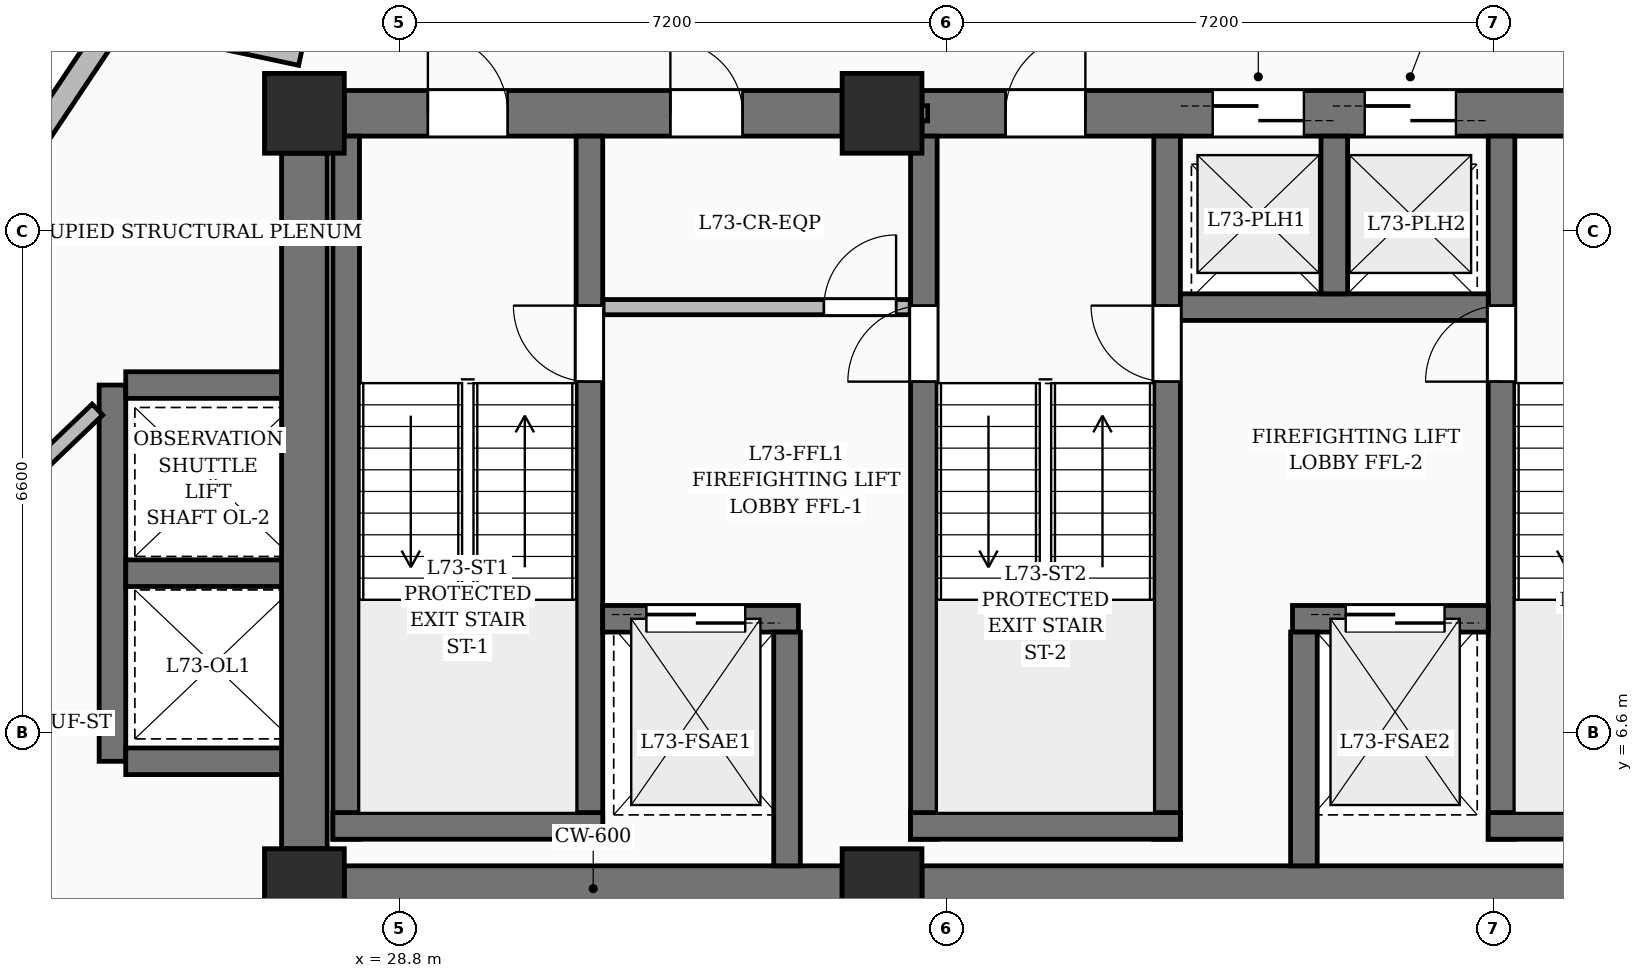
"""IFC4 building model, lengths in metres.
Left out: names, types, materials, properties, quantities, classifications, styles, units other than length and angle.
Written with IfcOpenShell. Run it as: python <this file> out.ifc"""

import sys

from ifc_helpers import new_model, si_unit, direction, frame, frame_2d, origin, origin_2d, place, context, subcontext, project, spatial, rectangle, extrude, element, fill, save


model = new_model("IFC4")
c1 = context("Model", 3, precision=1e-05, world=origin(), true_north=direction((0.0, 1.0)))
c2 = subcontext(c1, "Body", "Model", "MODEL_VIEW")
j1 = project(units=[si_unit("LENGTHUNIT", "METRE"), si_unit("PLANEANGLEUNIT", "RADIAN")], contexts=[c1])
p1 = place(None, origin())
s1 = spatial("IfcSite", under=j1, at=p1, CompositionType="ELEMENT")
p2 = place(p1, origin())
s2 = spatial("IfcBuilding", under=s1, at=p2, CompositionType="ELEMENT")
p3 = place(p2, frame((0.0, 0.0, 282.0)))
s3 = spatial("IfcBuildingStorey", under=s2, at=p3, CompositionType="ELEMENT", Elevation=282.0)
for number, where, z_axis, x_axis in (
    (1, (27.55, 4.55, 0.0), (0.0, 0.0, 1.0), (1.0, 0.0, 0.0)),
    (2, (35.15, 4.55, 0.0), (0.0, 0.0, 1.0), (1.0, 0.0, 0.0)),
    (3, (27.55, 14.75, 0.0), (0.0, 0.0, 1.0), (1.0, 0.0, 0.0)),
    (4, (35.15, 14.75, 0.0), (0.0, 0.0, 1.0), (1.0, 0.0, 0.0)),
):
    element("IfcColumn", number, at=place(p3, frame(where, z_axis=z_axis, x_axis=x_axis)), inside=s3, PredefinedType="COLUMN", context=c2, shape_type="SweptSolid", body=[
        extrude(rectangle(XDim=1.05, YDim=1.05, at=origin_2d()), origin(), (0.0, 0.0, 1.0), 3.75),
    ])
p4 = place(p3, frame((28.075, 4.55, 0.0), z_axis=(0.0, 0.0, 1.0), x_axis=(1.0, 0.0, 0.0)))
e5 = element("IfcWall", 5, at=p4, inside=s3, PredefinedType="SHEAR", context=c2, shape_type="SweptSolid", body=[
    extrude(rectangle(XDim=6.55, YDim=0.6, at=frame_2d((3.275, 0.0))), origin(), (0.0, 0.0, 1.0), 3.75),
])
p5 = place(p3, frame((35.675, 4.55, 0.0), z_axis=(0.0, 0.0, 1.0), x_axis=(1.0, 0.0, 0.0)))
e6 = element("IfcWall", 6, at=p5, inside=s3, PredefinedType="SHEAR", context=c2, shape_type="SweptSolid", body=[
    extrude(rectangle(XDim=10.85, YDim=0.6, at=frame_2d((5.425, 0.0))), origin(), (0.0, 0.0, 1.0), 3.75),
])
p6 = place(p3, frame((28.075, 14.75, 0.0), z_axis=(0.0, 0.0, 1.0), x_axis=(1.0, 0.0, 0.0)))
e7 = element("IfcWall", 7, at=p6, inside=s3, PredefinedType="SHEAR", context=c2, shape_type="SweptSolid", body=[
    extrude(rectangle(XDim=6.55, YDim=0.6, at=frame_2d((3.275, 0.0))), origin(), (0.0, 0.0, 1.0), 3.75),
])
p7 = place(p6, frame((1.1, 0.0, 0.0)))
e8 = element("IfcOpeningElement", 8, at=p7, cuts=e7, PredefinedType="OPENING", context=c2, shape_type="SweptSolid", body=[
    extrude(rectangle(XDim=1.05, YDim=2.15, at=frame_2d((0.525, 1.075))), frame((0.0, 0.31, 0.0), z_axis=(0.0, -1.0, 0.0), x_axis=(1.0, 0.0, 0.0)), (0.0, 0.0, 1.0), 0.62),
])
p8 = place(p6, frame((4.29, 0.0, 0.0)))
e9 = element("IfcOpeningElement", 9, at=p8, cuts=e7, PredefinedType="OPENING", context=c2, shape_type="SweptSolid", body=[
    extrude(rectangle(XDim=0.95, YDim=2.15, at=frame_2d((0.475, 1.075))), frame((0.0, 0.31, 0.0), z_axis=(0.0, -1.0, 0.0), x_axis=(1.0, 0.0, 0.0)), (0.0, 0.0, 1.0), 0.62),
])
p9 = place(p3, frame((35.675, 14.75, 0.0), z_axis=(0.0, 0.0, 1.0), x_axis=(1.0, 0.0, 0.0)))
e10 = element("IfcWall", 10, at=p9, inside=s3, PredefinedType="SHEAR", context=c2, shape_type="SweptSolid", body=[
    extrude(rectangle(XDim=10.85, YDim=0.6, at=frame_2d((5.425, 0.0))), origin(), (0.0, 0.0, 1.0), 3.75),
])
p10 = place(p9, frame((1.1, 0.0, 0.0)))
e11 = element("IfcOpeningElement", 11, at=p10, cuts=e10, PredefinedType="OPENING", context=c2, shape_type="SweptSolid", body=[
    extrude(rectangle(XDim=1.05, YDim=2.15, at=frame_2d((0.525, 1.075))), frame((0.0, 0.31, 0.0), z_axis=(0.0, -1.0, 0.0), x_axis=(1.0, 0.0, 0.0)), (0.0, 0.0, 1.0), 0.62),
])
p11 = place(p9, frame((8.7, 0.0, 0.0)))
e12 = element("IfcOpeningElement", 12, at=p11, cuts=e10, PredefinedType="OPENING", context=c2, shape_type="SweptSolid", body=[
    extrude(rectangle(XDim=1.05, YDim=2.15, at=frame_2d((0.525, 1.075))), frame((0.0, 0.31, 0.0), z_axis=(0.0, -1.0, 0.0), x_axis=(1.0, 0.0, 0.0)), (0.0, 0.0, 1.0), 0.62),
])
p12 = place(p9, frame((3.825, 0.0, 0.0)))
e13 = element("IfcOpeningElement", 13, at=p12, cuts=e10, PredefinedType="OPENING", context=c2, shape_type="SweptSolid", body=[
    extrude(rectangle(XDim=1.2, YDim=2.2, at=frame_2d((0.6, 1.1))), frame((0.0, 0.31, 0.0), z_axis=(0.0, -1.0, 0.0), x_axis=(1.0, 0.0, 0.0)), (0.0, 0.0, 1.0), 0.62),
])
p13 = place(p9, frame((5.825, 0.0, 0.0)))
e14 = element("IfcOpeningElement", 14, at=p13, cuts=e10, PredefinedType="OPENING", context=c2, shape_type="SweptSolid", body=[
    extrude(rectangle(XDim=1.2, YDim=2.2, at=frame_2d((0.6, 1.1))), frame((0.0, 0.31, 0.0), z_axis=(0.0, -1.0, 0.0), x_axis=(1.0, 0.0, 0.0)), (0.0, 0.0, 1.0), 0.62),
])
p14 = place(p3, frame((27.55, 5.075, 0.0), z_axis=(0.0, 0.0, 1.0), x_axis=(0.0, 1.0, 0.0)))
e15 = element("IfcWall", 15, at=p14, inside=s3, PredefinedType="SHEAR", context=c2, shape_type="SweptSolid", body=[
    extrude(rectangle(XDim=9.15, YDim=0.6, at=frame_2d((4.575, 0.0))), origin(), (0.0, 0.0, 1.0), 3.75),
])
p15 = place(p3, frame((28.1, 5.2, 0.0), z_axis=(0.0, 0.0, 1.0), x_axis=(0.0, 1.0, 0.0)))
e16 = element("IfcWall", 16, at=p15, inside=s3, PredefinedType="SOLIDWALL", context=c2, shape_type="SweptSolid", body=[
    extrude(rectangle(XDim=9.25, YDim=0.35, at=frame_2d((4.625, 0.0))), origin(), (0.0, 0.0, 1.0), 3.75),
])
p16 = place(p3, frame((31.3, 5.2, 0.0), z_axis=(0.0, 0.0, 1.0), x_axis=(0.0, 1.0, 0.0)))
e17 = element("IfcWall", 17, at=p16, inside=s3, PredefinedType="SOLIDWALL", context=c2, shape_type="SweptSolid", body=[
    extrude(rectangle(XDim=9.25, YDim=0.35, at=frame_2d((4.625, 0.0))), origin(), (0.0, 0.0, 1.0), 3.75),
])
p17 = place(p16, frame((6.02, 0.0, 0.0)))
e18 = element("IfcOpeningElement", 18, at=p17, cuts=e17, PredefinedType="OPENING", context=c2, shape_type="SweptSolid", body=[
    extrude(rectangle(XDim=1.0, YDim=2.15, at=frame_2d((0.5, 1.075))), frame((0.0, 0.185, 0.0), z_axis=(0.0, -1.0, 0.0), x_axis=(1.0, 0.0, 0.0)), (0.0, 0.0, 1.0), 0.37),
])
p18 = place(p3, frame((27.925, 5.375, 0.0), z_axis=(0.0, 0.0, 1.0), x_axis=(1.0, 0.0, 0.0)))
e19 = element("IfcWall", 19, at=p18, inside=s3, PredefinedType="SOLIDWALL", context=c2, shape_type="SweptSolid", body=[
    extrude(rectangle(XDim=3.55, YDim=0.35, at=frame_2d((1.775, 0.0))), origin(), (0.0, 0.0, 1.0), 3.75),
])
p19 = place(p3, frame((35.7, 5.2, 0.0), z_axis=(0.0, 0.0, 1.0), x_axis=(0.0, 1.0, 0.0)))
e20 = element("IfcWall", 20, at=p19, inside=s3, PredefinedType="SOLIDWALL", context=c2, shape_type="SweptSolid", body=[
    extrude(rectangle(XDim=9.25, YDim=0.35, at=frame_2d((4.625, 0.0))), origin(), (0.0, 0.0, 1.0), 3.75),
])
p20 = place(p19, frame((6.02, 0.0, 0.0)))
e21 = element("IfcOpeningElement", 21, at=p20, cuts=e20, PredefinedType="OPENING", context=c2, shape_type="SweptSolid", body=[
    extrude(rectangle(XDim=1.0, YDim=2.15, at=frame_2d((0.5, 1.075))), frame((0.0, 0.185, 0.0), z_axis=(0.0, -1.0, 0.0), x_axis=(1.0, 0.0, 0.0)), (0.0, 0.0, 1.0), 0.37),
])
p21 = place(p3, frame((38.9, 5.2, 0.0), z_axis=(0.0, 0.0, 1.0), x_axis=(0.0, 1.0, 0.0)))
e22 = element("IfcWall", 22, at=p21, inside=s3, PredefinedType="SOLIDWALL", context=c2, shape_type="SweptSolid", body=[
    extrude(rectangle(XDim=9.25, YDim=0.35, at=frame_2d((4.625, 0.0))), origin(), (0.0, 0.0, 1.0), 3.75),
])
p22 = place(p21, frame((6.02, 0.0, 0.0)))
e23 = element("IfcOpeningElement", 23, at=p22, cuts=e22, PredefinedType="OPENING", context=c2, shape_type="SweptSolid", body=[
    extrude(rectangle(XDim=1.0, YDim=2.15, at=frame_2d((0.5, 1.075))), frame((0.0, 0.185, 0.0), z_axis=(0.0, -1.0, 0.0), x_axis=(1.0, 0.0, 0.0)), (0.0, 0.0, 1.0), 0.37),
])
p23 = place(p3, frame((35.525, 5.375, 0.0), z_axis=(0.0, 0.0, 1.0), x_axis=(1.0, 0.0, 0.0)))
e24 = element("IfcWall", 24, at=p23, inside=s3, PredefinedType="SOLIDWALL", context=c2, shape_type="SweptSolid", body=[
    extrude(rectangle(XDim=3.55, YDim=0.35, at=frame_2d((1.775, 0.0))), origin(), (0.0, 0.0, 1.0), 3.75),
])
p24 = place(p3, frame((43.3, 5.2, 0.0), z_axis=(0.0, 0.0, 1.0), x_axis=(0.0, 1.0, 0.0)))
e25 = element("IfcWall", 25, at=p24, inside=s3, PredefinedType="SOLIDWALL", context=c2, shape_type="SweptSolid", body=[
    extrude(rectangle(XDim=9.25, YDim=0.35, at=frame_2d((4.625, 0.0))), origin(), (0.0, 0.0, 1.0), 3.75),
])
p25 = place(p24, frame((6.02, 0.0, 0.0)))
e26 = element("IfcOpeningElement", 26, at=p25, cuts=e25, PredefinedType="OPENING", context=c2, shape_type="SweptSolid", body=[
    extrude(rectangle(XDim=1.0, YDim=2.15, at=frame_2d((0.5, 1.075))), frame((0.0, 0.185, 0.0), z_axis=(0.0, -1.0, 0.0), x_axis=(1.0, 0.0, 0.0)), (0.0, 0.0, 1.0), 0.37),
])
p26 = place(p3, frame((43.125, 5.375, 0.0), z_axis=(0.0, 0.0, 1.0), x_axis=(1.0, 0.0, 0.0)))
e27 = element("IfcWall", 27, at=p26, inside=s3, PredefinedType="SOLIDWALL", context=c2, shape_type="SweptSolid", body=[
    extrude(rectangle(XDim=3.55, YDim=0.35, at=frame_2d((1.775, 0.0))), origin(), (0.0, 0.0, 1.0), 3.75),
])
p27 = place(p3, frame((31.475, 8.1, 0.0), z_axis=(0.0, 0.0, 1.0), x_axis=(1.0, 0.0, 0.0)))
e28 = element("IfcWall", 28, at=p27, inside=s3, PredefinedType="SOLIDWALL", context=c2, shape_type="SweptSolid", body=[
    extrude(rectangle(XDim=2.575, YDim=0.35, at=frame_2d((1.288, 0.0))), origin(), (0.0, 0.0, 1.0), 3.75),
])
p28 = place(p27, frame((0.575, 0.0, 0.0)))
e29 = element("IfcOpeningElement", 29, at=p28, cuts=e28, PredefinedType="OPENING", context=c2, shape_type="SweptSolid", body=[
    extrude(rectangle(XDim=1.3, YDim=2.25, at=frame_2d((0.65, 1.125))), frame((0.0, 0.185, 0.0), z_axis=(0.0, -1.0, 0.0), x_axis=(1.0, 0.0, 0.0)), (0.0, 0.0, 1.0), 0.37),
])
p29 = place(p3, frame((40.55, 8.1, 0.0), z_axis=(0.0, 0.0, 1.0), x_axis=(1.0, 0.0, 0.0)))
e30 = element("IfcWall", 30, at=p29, inside=s3, PredefinedType="SOLIDWALL", context=c2, shape_type="SweptSolid", body=[
    extrude(rectangle(XDim=2.575, YDim=0.35, at=frame_2d((1.288, 0.0))), origin(), (0.0, 0.0, 1.0), 3.75),
])
p30 = place(p29, frame((0.7, 0.0, 0.0)))
e31 = element("IfcOpeningElement", 31, at=p30, cuts=e30, PredefinedType="OPENING", context=c2, shape_type="SweptSolid", body=[
    extrude(rectangle(XDim=1.3, YDim=2.25, at=frame_2d((0.65, 1.125))), frame((0.0, 0.185, 0.0), z_axis=(0.0, -1.0, 0.0), x_axis=(1.0, 0.0, 0.0)), (0.0, 0.0, 1.0), 0.37),
])
for number, where, z_axis, x_axis in (
    (32, (33.9, 4.85, 0.0), (0.0, 0.0, 1.0), (0.0, 1.0, 0.0)),
    (33, (40.7, 4.85, 0.0), (0.0, 0.0, 1.0), (0.0, 1.0, 0.0)),
):
    element("IfcWall", number, at=place(p3, frame(where, z_axis=z_axis, x_axis=x_axis)), inside=s3, PredefinedType="SOLIDWALL", context=c2, shape_type="SweptSolid", body=[
        extrude(rectangle(XDim=3.075, YDim=0.35, at=frame_2d((1.538, 0.0))), origin(), (0.0, 0.0, 1.0), 3.75),
    ])
p31 = place(p3, frame((39.075, 12.2, 0.0), z_axis=(0.0, 0.0, 1.0), x_axis=(1.0, 0.0, 0.0)))
e34 = element("IfcWall", 34, at=p31, inside=s3, PredefinedType="SOLIDWALL", context=c2, shape_type="SweptSolid", body=[
    extrude(rectangle(XDim=4.05, YDim=0.35, at=frame_2d((2.025, 0.0))), origin(), (0.0, 0.0, 1.0), 3.75),
])
p32 = place(p3, frame((41.1, 12.375, 0.0), z_axis=(0.0, 0.0, 1.0), x_axis=(0.0, 1.0, 0.0)))
e35 = element("IfcWall", 35, at=p32, inside=s3, PredefinedType="SOLIDWALL", context=c2, shape_type="SweptSolid", body=[
    extrude(rectangle(XDim=2.075, YDim=0.35, at=frame_2d((1.038, 0.0))), origin(), (0.0, 0.0, 1.0), 3.75),
])
p33 = place(p3, frame((25.025, 6.225, 0.0), z_axis=(0.0, 0.0, 1.0), x_axis=(0.0, 1.0, 0.0)))
e36 = element("IfcWall", 36, at=p33, inside=s3, PredefinedType="SOLIDWALL", context=c2, shape_type="SweptSolid", body=[
    extrude(rectangle(XDim=4.95, YDim=0.35, at=frame_2d((2.475, 0.0))), origin(), (0.0, 0.0, 1.0), 3.75),
])
for number, where, z_axis, x_axis in (
    (37, (25.2, 6.225, 0.0), (0.0, 0.0, 1.0), (1.0, 0.0, 0.0)),
    (38, (25.2, 8.7, 0.0), (0.0, 0.0, 1.0), (1.0, 0.0, 0.0)),
    (39, (25.2, 11.175, 0.0), (0.0, 0.0, 1.0), (1.0, 0.0, 0.0)),
):
    element("IfcWall", number, at=place(p3, frame(where, z_axis=z_axis, x_axis=x_axis)), inside=s3, PredefinedType="SOLIDWALL", context=c2, shape_type="SweptSolid", body=[
        extrude(rectangle(XDim=2.05, YDim=0.35, at=frame_2d((1.025, 0.0))), origin(), (0.0, 0.0, 1.0), 3.75),
    ])
p34 = place(p3, frame((24.969, 16.069, 0.0), z_axis=(0.0, 0.0, 1.0), x_axis=(0.977987970982, -0.208661277227, 0.0)))
e40 = element("IfcWall", 40, at=p34, inside=s3, PredefinedType="SOLIDWALL", context=c2, shape_type="SweptSolid", body=[
    extrude(rectangle(XDim=2.594, YDim=0.3, at=frame_2d((1.297, 0.0))), origin(), (0.0, 0.0, 1.0), 2.696),
])
p35 = place(p3, frame((21.463, 10.583, 0.0), z_axis=(0.0, 0.0, 1.0), x_axis=(0.55522657145, 0.831699136921, 0.0)))
e41 = element("IfcWall", 41, at=p35, inside=s3, PredefinedType="SOLIDWALL", context=c2, shape_type="SweptSolid", body=[
    extrude(rectangle(XDim=6.421, YDim=0.3, at=frame_2d((3.21, 0.0))), origin(), (0.0, 0.0, 1.0), 3.5),
])
p36 = place(p35, frame((2.475, 0.0, 0.55)))
e42 = element("IfcOpeningElement", 42, at=p36, cuts=e41, PredefinedType="OPENING", context=c2, shape_type="SweptSolid", body=[
    extrude(rectangle(XDim=1.6, YDim=2.2, at=frame_2d((0.8, 1.1))), frame((0.0, 0.16, 0.0), z_axis=(0.0, -1.0, 0.0), x_axis=(1.0, 0.0, 0.0)), (0.0, 0.0, 1.0), 0.32),
])
p37 = place(p3, frame((34.72, 14.75, 0.0), z_axis=(0.0, 0.0, 1.0), x_axis=(1.0, 0.0, 0.0)))
e43 = element("IfcWall", 43, at=p37, inside=s3, PredefinedType="PARTITIONING", context=c2, shape_type="SweptSolid", body=[
    extrude(rectangle(XDim=1.03, YDim=0.2, at=frame_2d((0.515, 0.0))), origin(), (0.0, 0.0, 1.0), 2.685),
])
p38 = place(p3, frame((31.48, 12.2, 0.0), z_axis=(0.0, 0.0, 1.0), x_axis=(1.0, 0.0, 0.0)))
e44 = element("IfcWall", 44, at=p38, inside=s3, PredefinedType="PARTITIONING", context=c2, shape_type="SweptSolid", body=[
    extrude(rectangle(XDim=4.04, YDim=0.2, at=frame_2d((2.02, 0.0))), origin(), (0.0, 0.0, 1.0), 3.5),
])
p39 = place(p38, frame((2.905, 0.0, 0.0)))
e45 = element("IfcOpeningElement", 45, at=p39, cuts=e44, PredefinedType="OPENING", context=c2, shape_type="SweptSolid", body=[
    extrude(rectangle(XDim=0.95, YDim=2.15, at=frame_2d((0.475, 1.075))), frame((0.0, 0.11, 0.0), z_axis=(0.0, -1.0, 0.0), x_axis=(1.0, 0.0, 0.0)), (0.0, 0.0, 1.0), 0.22),
])
p40 = place(p3, frame((24.827, 10.852, 0.0), z_axis=(0.0, 0.0, 1.0), x_axis=(-0.722620836198, -0.691244621746, 0.0)))
e46 = element("IfcWall", 46, at=p40, inside=s3, PredefinedType="PARTITIONING", context=c2, shape_type="SweptSolid", body=[
    extrude(rectangle(XDim=3.027, YDim=0.2, at=frame_2d((1.513, 0.0))), origin(), (0.0, 0.0, 1.0), 3.5),
])
p41 = place(p7, origin())
e47 = element("IfcDoor", 47, at=p41, inside=s3, OperationType="SINGLE_SWING_LEFT", PredefinedType="DOOR", context=c2, shape_type="SweptSolid", body=[
    extrude(rectangle(XDim=1.05, YDim=2.15, at=frame_2d((0.525, 1.075))), frame((0.0, 0.025, 0.0), z_axis=(0.0, -1.0, 0.0), x_axis=(1.0, 0.0, 0.0)), (0.0, 0.0, 1.0), 0.05),
])
fill(e8, e47)
p42 = place(p10, origin())
e48 = element("IfcDoor", 48, at=p42, inside=s3, OperationType="SINGLE_SWING_RIGHT", PredefinedType="DOOR", context=c2, shape_type="SweptSolid", body=[
    extrude(rectangle(XDim=1.05, YDim=2.15, at=frame_2d((0.525, 1.075))), frame((0.0, 0.025, 0.0), z_axis=(0.0, -1.0, 0.0), x_axis=(1.0, 0.0, 0.0)), (0.0, 0.0, 1.0), 0.05),
])
fill(e11, e48)
p43 = place(p17, origin())
e49 = element("IfcDoor", 49, at=p43, inside=s3, OperationType="SINGLE_SWING_RIGHT", PredefinedType="DOOR", context=c2, shape_type="SweptSolid", body=[
    extrude(rectangle(XDim=1.0, YDim=2.15, at=frame_2d((0.5, 1.075))), frame((0.0, 0.025, 0.0), z_axis=(0.0, -1.0, 0.0), x_axis=(1.0, 0.0, 0.0)), (0.0, 0.0, 1.0), 0.05),
])
fill(e18, e49)
p44 = place(p20, origin())
e50 = element("IfcDoor", 50, at=p44, inside=s3, OperationType="SINGLE_SWING_LEFT", PredefinedType="DOOR", context=c2, shape_type="SweptSolid", body=[
    extrude(rectangle(XDim=1.0, YDim=2.15, at=frame_2d((0.5, 1.075))), frame((0.0, 0.025, 0.0), z_axis=(0.0, -1.0, 0.0), x_axis=(1.0, 0.0, 0.0)), (0.0, 0.0, 1.0), 0.05),
])
fill(e21, e50)
p45 = place(p22, origin())
e51 = element("IfcDoor", 51, at=p45, inside=s3, OperationType="SINGLE_SWING_RIGHT", PredefinedType="DOOR", context=c2, shape_type="SweptSolid", body=[
    extrude(rectangle(XDim=1.0, YDim=2.15, at=frame_2d((0.5, 1.075))), frame((0.0, 0.025, 0.0), z_axis=(0.0, -1.0, 0.0), x_axis=(1.0, 0.0, 0.0)), (0.0, 0.0, 1.0), 0.05),
])
fill(e23, e51)
p46 = place(p25, origin())
e52 = element("IfcDoor", 52, at=p46, inside=s3, OperationType="SINGLE_SWING_LEFT", PredefinedType="DOOR", context=c2, shape_type="SweptSolid", body=[
    extrude(rectangle(XDim=1.0, YDim=2.15, at=frame_2d((0.5, 1.075))), frame((0.0, 0.025, 0.0), z_axis=(0.0, -1.0, 0.0), x_axis=(1.0, 0.0, 0.0)), (0.0, 0.0, 1.0), 0.05),
])
fill(e26, e52)
p47 = place(p28, origin())
e53 = element("IfcDoor", 53, at=p47, inside=s3, OperationType="DOUBLE_DOOR_SLIDING", PredefinedType="DOOR", context=c2, shape_type="SweptSolid", body=[
    extrude(rectangle(XDim=1.3, YDim=2.25, at=frame_2d((0.65, 1.125))), frame((0.0, 0.025, 0.0), z_axis=(0.0, -1.0, 0.0), x_axis=(1.0, 0.0, 0.0)), (0.0, 0.0, 1.0), 0.05),
])
fill(e29, e53)
p48 = place(p30, origin())
e54 = element("IfcDoor", 54, at=p48, inside=s3, OperationType="DOUBLE_DOOR_SLIDING", PredefinedType="DOOR", context=c2, shape_type="SweptSolid", body=[
    extrude(rectangle(XDim=1.3, YDim=2.25, at=frame_2d((0.65, 1.125))), frame((0.0, 0.025, 0.0), z_axis=(0.0, -1.0, 0.0), x_axis=(1.0, 0.0, 0.0)), (0.0, 0.0, 1.0), 0.05),
])
fill(e31, e54)
p49 = place(p12, origin())
e55 = element("IfcDoor", 55, at=p49, inside=s3, OperationType="DOUBLE_DOOR_SLIDING", PredefinedType="DOOR", context=c2, shape_type="SweptSolid", body=[
    extrude(rectangle(XDim=1.2, YDim=2.2, at=frame_2d((0.6, 1.1))), frame((0.0, 0.025, 0.0), z_axis=(0.0, -1.0, 0.0), x_axis=(1.0, 0.0, 0.0)), (0.0, 0.0, 1.0), 0.05),
])
fill(e13, e55)
p50 = place(p13, origin())
e56 = element("IfcDoor", 56, at=p50, inside=s3, OperationType="DOUBLE_DOOR_SLIDING", PredefinedType="DOOR", context=c2, shape_type="SweptSolid", body=[
    extrude(rectangle(XDim=1.2, YDim=2.2, at=frame_2d((0.6, 1.1))), frame((0.0, 0.025, 0.0), z_axis=(0.0, -1.0, 0.0), x_axis=(1.0, 0.0, 0.0)), (0.0, 0.0, 1.0), 0.05),
])
fill(e14, e56)
p51 = place(p39, origin())
e57 = element("IfcDoor", 57, at=p51, inside=s3, OperationType="SINGLE_SWING_RIGHT", PredefinedType="DOOR", context=c2, shape_type="SweptSolid", body=[
    extrude(rectangle(XDim=0.95, YDim=2.15, at=frame_2d((0.475, 1.075))), frame((0.0, 0.025, 0.0), z_axis=(0.0, -1.0, 0.0), x_axis=(1.0, 0.0, 0.0)), (0.0, 0.0, 1.0), 0.05),
])
fill(e45, e57)
p52 = place(p8, origin())
e58 = element("IfcDoor", 58, at=p52, inside=s3, OperationType="SINGLE_SWING_LEFT", PredefinedType="DOOR", context=c2, shape_type="SweptSolid", body=[
    extrude(rectangle(XDim=0.95, YDim=2.15, at=frame_2d((0.475, 1.075))), frame((0.0, 0.025, 0.0), z_axis=(0.0, -1.0, 0.0), x_axis=(1.0, 0.0, 0.0)), (0.0, 0.0, 1.0), 0.05),
])
fill(e9, e58)
save(model, sys.argv[1])
